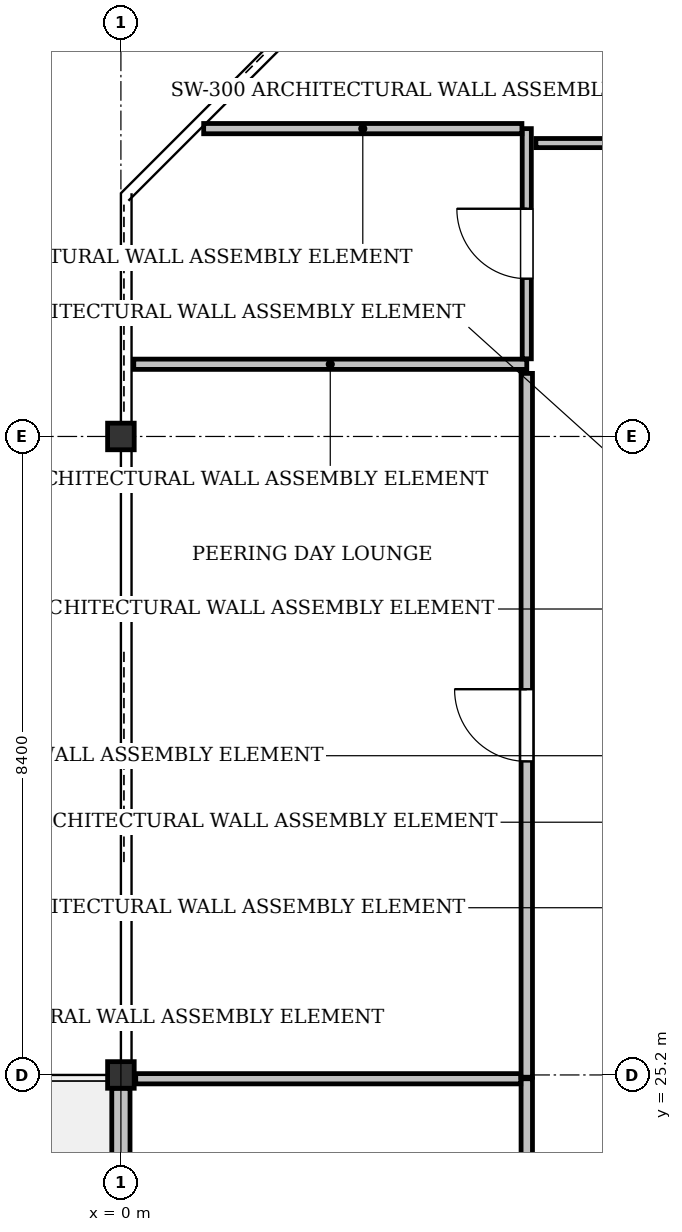
"""IFC4 building model, lengths in metres.
Left out: names, types, materials, properties, quantities, classifications, styles, units other than length and angle.
Written with IfcOpenShell. Run it as: python <this file> out.ifc"""

import sys

from ifc_helpers import new_model, si_unit, direction, frame, frame_2d, origin, origin_2d, place, context, subcontext, project, spatial, rectangle, i_section, extrude, element, fill, save


model = new_model("IFC4")
c1 = context("Model", 3, precision=1e-05, world=origin(), true_north=direction((0.0, 1.0)))
c2 = subcontext(c1, "Body", "Model", "MODEL_VIEW")
j1 = project(units=[si_unit("LENGTHUNIT", "METRE"), si_unit("PLANEANGLEUNIT", "RADIAN")], contexts=[c1])
p1 = place(None, origin())
s1 = spatial("IfcSite", under=j1, at=p1, CompositionType="ELEMENT")
p2 = place(p1, origin())
s2 = spatial("IfcBuilding", under=s1, at=p2, CompositionType="ELEMENT")
p3 = place(p2, frame((0.0, 0.0, 220.6)))
s3 = spatial("IfcBuildingStorey", under=s2, at=p3, CompositionType="ELEMENT", Elevation=220.6)
for number, where, z_axis, x_axis in (
    (1, (0.0, 25.2, 0.0), (0.0, 0.0, 1.0), (1.0, 0.0, 0.0)),
    (2, (0.0, 33.6, 0.0), (0.0, 0.0, 1.0), (1.0, 0.0, 0.0)),
):
    element("IfcColumn", number, at=place(p3, frame(where, z_axis=z_axis, x_axis=x_axis)), inside=s3, PredefinedType="COLUMN", context=c2, shape_type="SweptSolid", body=[
        extrude(i_section(OverallWidth=0.35, OverallDepth=0.35, WebThickness=0.02, FlangeThickness=0.032, at=origin_2d()), origin(), (0.0, 0.0, 1.0), 4.1),
    ])
p4 = place(p3, frame((0.0, 16.975, 0.0), z_axis=(0.0, 0.0, 1.0), x_axis=(0.0, 1.0, 0.0)))
e3 = element("IfcWall", 3, at=p4, inside=s3, PredefinedType="STANDARD", context=c2, shape_type="SweptSolid", body=[
    extrude(rectangle(XDim=8.05, YDim=0.24, at=frame_2d((4.025, 0.0))), origin(), (0.0, 0.0, 1.0), 3.525),
])
p5 = place(p4, frame((0.3, 0.0, 0.0)))
e4 = element("IfcOpeningElement", 4, at=p5, cuts=e3, PredefinedType="OPENING", context=c2, shape_type="SweptSolid", body=[
    extrude(rectangle(XDim=1.2, YDim=2.2, at=frame_2d((0.6, 1.1))), frame((0.0, 0.13, 0.0), z_axis=(0.0, -1.0, 0.0), x_axis=(1.0, 0.0, 0.0)), (0.0, 0.0, 1.0), 0.26),
])
p6 = place(p4, frame((3.275, 0.0, 0.9)))
e5 = element("IfcOpeningElement", 5, at=p6, cuts=e3, PredefinedType="OPENING", context=c2, shape_type="SweptSolid", body=[
    extrude(rectangle(XDim=1.5, YDim=1.6, at=frame_2d((0.75, 0.8))), frame((0.0, 0.13, 0.0), z_axis=(0.0, -1.0, 0.0), x_axis=(1.0, 0.0, 0.0)), (0.0, 0.0, 1.0), 0.26),
])
p7 = place(p3, frame((0.169, 34.55, 0.0), z_axis=(0.0, 0.0, 1.0), x_axis=(1.0, 0.0, 0.0)))
e6 = element("IfcWall", 6, at=p7, inside=s3, PredefinedType="PARTITIONING", context=c2, shape_type="SweptSolid", body=[
    extrude(rectangle(XDim=5.171, YDim=0.135, at=frame_2d((2.585, 0.0))), origin(), (0.0, 0.0, 1.0), 3.825),
])
p8 = place(p3, frame((5.34, 34.622, 0.0), z_axis=(0.0, 0.0, 1.0), x_axis=(0.0, 1.0, 0.0)))
e7 = element("IfcWall", 7, at=p8, inside=s3, PredefinedType="PARTITIONING", context=c2, shape_type="SweptSolid", body=[
    extrude(rectangle(XDim=3.028, YDim=0.12, at=frame_2d((1.514, 0.0))), origin(), (0.0, 0.0, 1.0), 3.825),
])
p9 = place(p8, frame((1.054, 0.0, 0.0)))
e8 = element("IfcOpeningElement", 8, at=p9, cuts=e7, PredefinedType="OPENING", context=c2, shape_type="SweptSolid", body=[
    extrude(rectangle(XDim=0.92, YDim=2.1, at=frame_2d((0.46, 1.05))), frame((0.0, 0.07, 0.0), z_axis=(0.0, -1.0, 0.0), x_axis=(1.0, 0.0, 0.0)), (0.0, 0.0, 1.0), 0.14),
])
p10 = place(p3, frame((5.276, 37.65, 0.0), z_axis=(0.0, 0.0, 1.0), x_axis=(-1.0, 0.0, 0.0)))
e9 = element("IfcWall", 9, at=p10, inside=s3, PredefinedType="PARTITIONING", context=c2, shape_type="SweptSolid", body=[
    extrude(rectangle(XDim=4.187, YDim=0.135, at=frame_2d((2.093, 0.0))), origin(), (0.0, 0.0, 1.0), 3.825),
])
p11 = place(p3, frame((5.34, 15.87, 0.0), z_axis=(0.0, 0.0, 1.0), x_axis=(0.0, 1.0, 0.0)))
e10 = element("IfcWall", 10, at=p11, inside=s3, PredefinedType="PARTITIONING", context=c2, shape_type="SweptSolid", body=[
    extrude(rectangle(XDim=9.28, YDim=0.15, at=frame_2d((4.64, 0.0))), origin(), (0.0, 0.0, 1.0), 3.365),
])
p12 = place(p11, frame((4.165, 0.0, 0.0)))
e11 = element("IfcOpeningElement", 11, at=p12, cuts=e10, PredefinedType="OPENING", context=c2, shape_type="SweptSolid", body=[
    extrude(rectangle(XDim=0.95, YDim=2.15, at=frame_2d((0.475, 1.075))), frame((0.0, 0.085, 0.0), z_axis=(0.0, -1.0, 0.0), x_axis=(1.0, 0.0, 0.0)), (0.0, 0.0, 1.0), 0.17),
])
p13 = place(p3, frame((5.261, 25.15, 0.0), z_axis=(0.0, 0.0, 1.0), x_axis=(-1.0, 0.0, 0.0)))
e12 = element("IfcWall", 12, at=p13, inside=s3, PredefinedType="PARTITIONING", context=c2, shape_type="SweptSolid", body=[
    extrude(rectangle(XDim=5.066, YDim=0.135, at=frame_2d((2.533, 0.0))), origin(), (0.0, 0.0, 1.0), 3.365),
])
p14 = place(p3, frame((5.34, 25.17, 0.0), z_axis=(0.0, 0.0, 1.0), x_axis=(0.0, 1.0, 0.0)))
e13 = element("IfcWall", 13, at=p14, inside=s3, PredefinedType="PARTITIONING", context=c2, shape_type="SweptSolid", body=[
    extrude(rectangle(XDim=9.26, YDim=0.15, at=frame_2d((4.63, 0.0))), origin(), (0.0, 0.0, 1.0), 3.365),
])
p15 = place(p14, frame((4.155, 0.0, 0.0)))
e14 = element("IfcOpeningElement", 14, at=p15, cuts=e13, PredefinedType="OPENING", context=c2, shape_type="SweptSolid", body=[
    extrude(rectangle(XDim=0.95, YDim=2.15, at=frame_2d((0.475, 1.075))), frame((0.0, 0.085, 0.0), z_axis=(0.0, -1.0, 0.0), x_axis=(1.0, 0.0, 0.0)), (0.0, 0.0, 1.0), 0.17),
])
p16 = place(p3, frame((5.46, 37.46, 0.0), z_axis=(0.0, 0.0, 1.0), x_axis=(1.0, 0.0, 0.0)))
e15 = element("IfcWall", 15, at=p16, inside=s3, PredefinedType="PARTITIONING", context=c2, shape_type="SweptSolid", body=[
    extrude(rectangle(XDim=2.19, YDim=0.12, at=frame_2d((1.095, 0.0))), origin(), (0.0, 0.0, 1.0), 3.825),
])
p17 = place(p9, origin())
e16 = element("IfcDoor", 16, at=p17, inside=s3, OperationType="SINGLE_SWING_RIGHT", PredefinedType="DOOR", context=c2, shape_type="SweptSolid", body=[
    extrude(rectangle(XDim=0.92, YDim=2.1, at=frame_2d((0.46, 1.05))), frame((0.0, 0.025, 0.0), z_axis=(0.0, -1.0, 0.0), x_axis=(1.0, 0.0, 0.0)), (0.0, 0.0, 1.0), 0.05),
])
fill(e8, e16)
p18 = place(p15, origin())
e17 = element("IfcDoor", 17, at=p18, inside=s3, OperationType="SINGLE_SWING_RIGHT", PredefinedType="DOOR", context=c2, shape_type="SweptSolid", body=[
    extrude(rectangle(XDim=0.95, YDim=2.15, at=frame_2d((0.475, 1.075))), frame((0.0, 0.025, 0.0), z_axis=(0.0, -1.0, 0.0), x_axis=(1.0, 0.0, 0.0)), (0.0, 0.0, 1.0), 0.05),
])
fill(e14, e17)
save(model, sys.argv[1])
